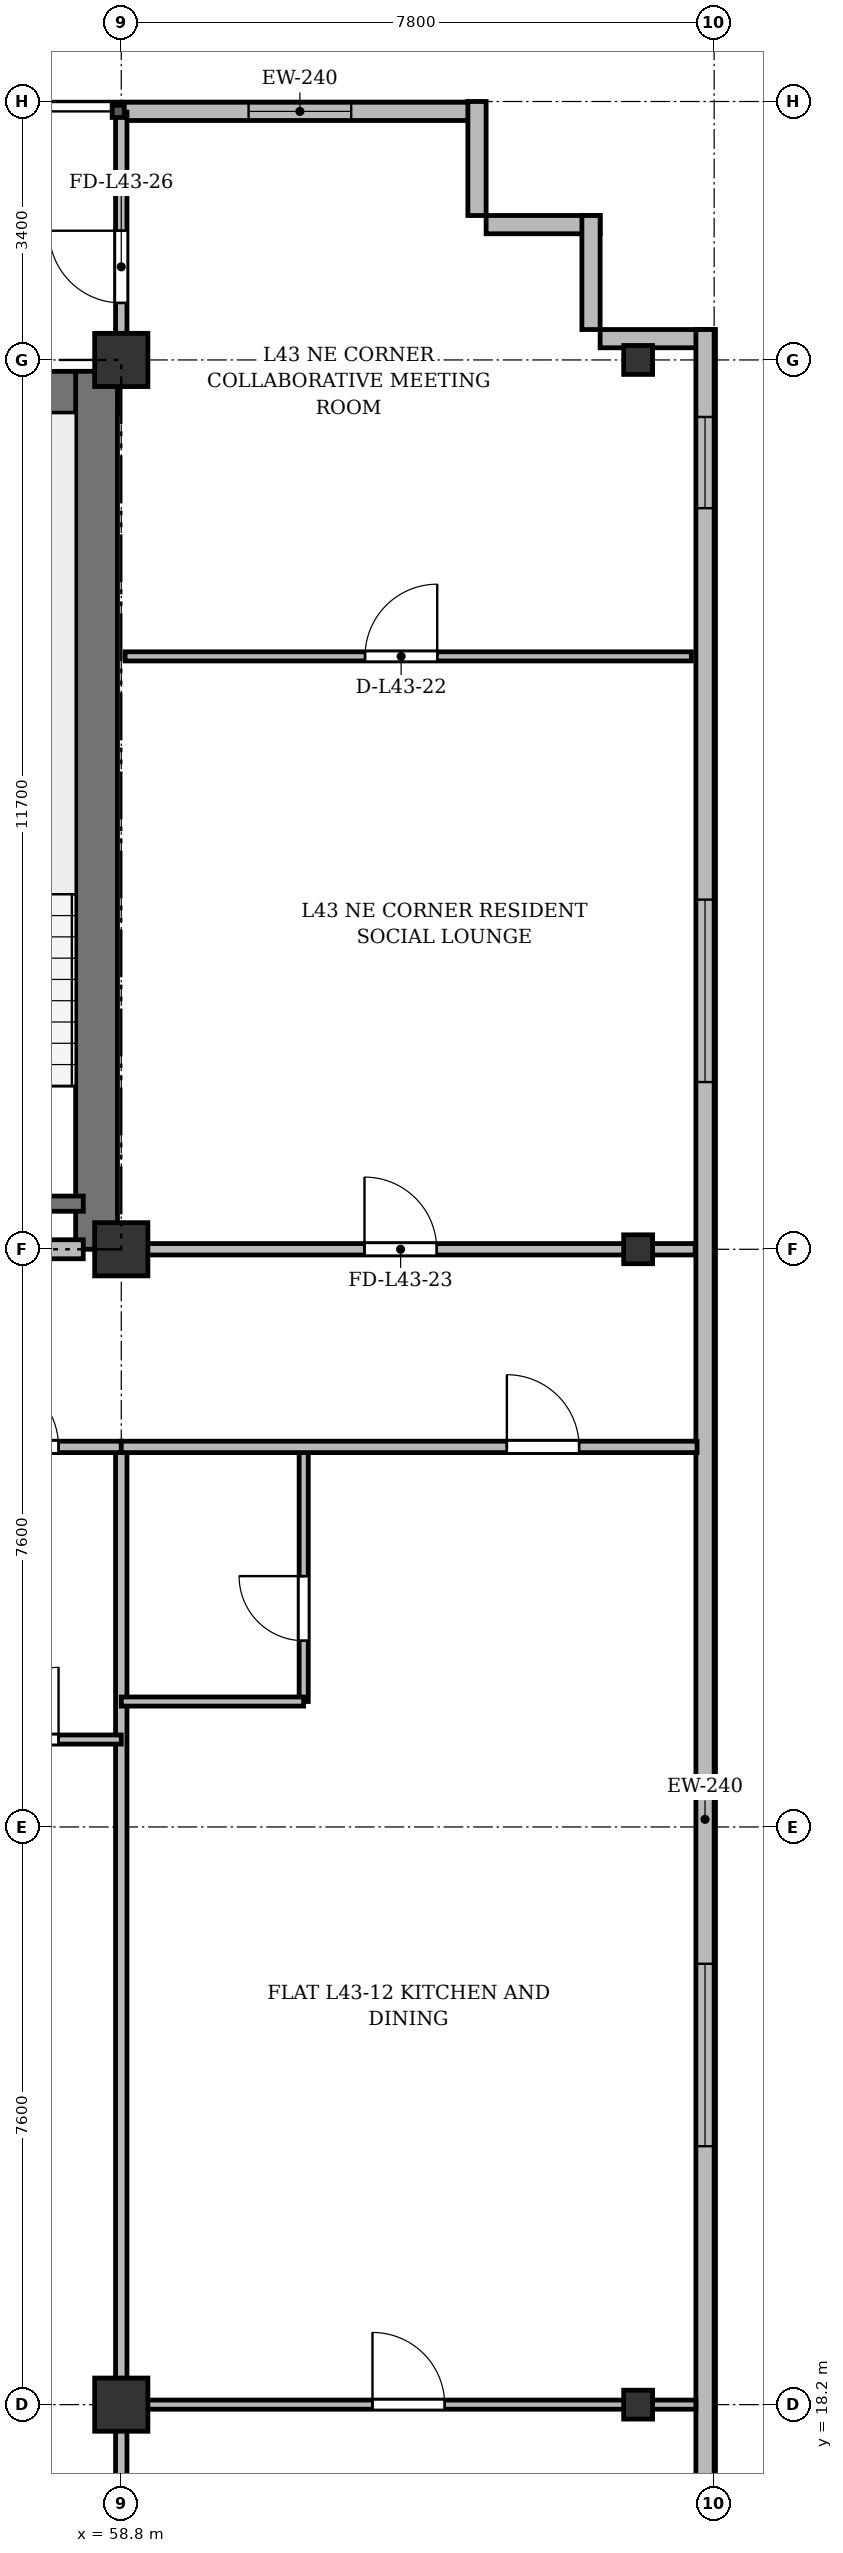
"""IFC4 building model, lengths in metres.
Left out: names, types, materials, properties, quantities, classifications, styles, units other than length and angle.
Written with IfcOpenShell. Run it as: python <this file> out.ifc"""

import sys

from ifc_helpers import new_model, si_unit, direction, frame, frame_2d, origin, origin_2d, place, context, subcontext, project, spatial, rectangle, i_section, extrude, source, transform, mapped, element, fill, save


model = new_model("IFC4")
c1 = context("Model", 3, precision=1e-05, world=origin(), true_north=direction((0.0, 1.0)))
c2 = subcontext(c1, "Body", "Model", "MODEL_VIEW")
j1 = project(units=[si_unit("LENGTHUNIT", "METRE"), si_unit("PLANEANGLEUNIT", "RADIAN")], contexts=[c1])
p1 = place(None, origin())
s1 = spatial("IfcSite", under=j1, at=p1, CompositionType="ELEMENT")
p2 = place(p1, origin())
s2 = spatial("IfcBuilding", under=s1, at=p2, CompositionType="ELEMENT")
p3 = place(p2, frame((0.0, 0.0, 164.5)))
s3 = spatial("IfcBuildingStorey", under=s2, at=p3, CompositionType="ELEMENT", Elevation=164.5)
m1 = source(origin(), c2, "Body", "SweptSolid", [
    extrude(rectangle(XDim=0.7, YDim=0.7, at=origin_2d()), origin(), (0.0, 0.0, 1.0), 3.6),
])
for number, where, z_axis, x_axis in (
    (1, (58.8, 18.2, 0.0), (0.0, 0.0, 1.0), (1.0, 0.0, 0.0)),
    (2, (58.8, 33.4, 0.0), (0.0, 0.0, 1.0), (1.0, 0.0, 0.0)),
    (3, (58.8, 45.1, 0.0), (0.0, 0.0, 1.0), (1.0, 0.0, 0.0)),
):
    element("IfcColumn", number, at=place(p3, frame(where, z_axis=z_axis, x_axis=x_axis)), inside=s3, PredefinedType="COLUMN", context=c2, shape_type="MappedRepresentation", body=[
        mapped(m1, transform((0.0, 0.0, 0.0), x_axis=(1.0, 0.0, 0.0), y_axis=(0.0, 1.0, 0.0), z_axis=(0.0, 0.0, 1.0), scale=1.0)),
    ])
m2 = source(origin(), c2, "Body", "SweptSolid", [
    extrude(i_section(OverallWidth=0.38, OverallDepth=0.38, WebThickness=0.02, FlangeThickness=0.03, at=origin_2d()), origin(), (0.0, 0.0, 1.0), 3.6),
])
for number, where, z_axis, x_axis in (
    (4, (65.6, 18.2, 0.0), (0.0, 0.0, 1.0), (1.0, 0.0, 0.0)),
    (5, (65.6, 33.4, 0.0), (0.0, 0.0, 1.0), (1.0, 0.0, 0.0)),
    (6, (65.6, 45.1, 0.0), (0.0, 0.0, 1.0), (1.0, 0.0, 0.0)),
):
    element("IfcColumn", number, at=place(p3, frame(where, z_axis=z_axis, x_axis=x_axis)), inside=s3, PredefinedType="COLUMN", context=c2, shape_type="MappedRepresentation", body=[
        mapped(m2, transform((0.0, 0.0, 0.0), x_axis=(1.0, 0.0, 0.0), y_axis=(0.0, 1.0, 0.0), z_axis=(0.0, 0.0, 1.0), scale=1.0)),
    ])
p4 = place(p3, frame((58.8, 48.37, 0.0), z_axis=(0.0, 0.0, 1.0), x_axis=(1.0, 0.0, 0.0)))
e7 = element("IfcWall", 7, at=p4, inside=s3, PredefinedType="SOLIDWALL", context=c2, shape_type="SweptSolid", body=[
    extrude(rectangle(XDim=4.7, YDim=0.24, at=frame_2d((2.35, 0.0))), origin(), (0.0, 0.0, 1.0), 3.35),
])
p5 = place(p4, frame((1.675, 0.0, 0.9)))
e8 = element("IfcOpeningElement", 8, at=p5, cuts=e7, PredefinedType="OPENING", context=c2, shape_type="SweptSolid", body=[
    extrude(rectangle(XDim=1.35, YDim=1.5, at=frame_2d((0.675, 0.75))), frame((0.0, 0.13, 0.0), z_axis=(0.0, -1.0, 0.0), x_axis=(1.0, 0.0, 0.0)), (0.0, 0.0, 1.0), 0.26),
])
for number, where, z_axis, x_axis in (
    (9, (63.48, 48.5, 0.0), (0.0, 0.0, 1.0), (0.0, -1.0, 0.0)),
    (10, (63.6, 46.88, 0.0), (0.0, 0.0, 1.0), (1.0, 0.0, 0.0)),
    (11, (64.98, 47.0, 0.0), (0.0, 0.0, 1.0), (0.0, -1.0, 0.0)),
    (12, (65.1, 45.38, 0.0), (0.0, 0.0, 1.0), (1.0, 0.0, 0.0)),
):
    element("IfcWall", number, at=place(p3, frame(where, z_axis=z_axis, x_axis=x_axis)), inside=s3, PredefinedType="SOLIDWALL", context=c2, shape_type="SweptSolid", body=[
        extrude(rectangle(XDim=1.5, YDim=0.24, at=frame_2d((0.75, 0.0))), origin(), (0.0, 0.0, 1.0), 3.35),
    ])
p6 = place(p3, frame((66.48, 45.5, 0.0), z_axis=(0.0, 0.0, 1.0), x_axis=(0.0, -1.0, 0.0)))
e13 = element("IfcWall", 13, at=p6, inside=s3, PredefinedType="SOLIDWALL", context=c2, shape_type="SweptSolid", body=[
    extrude(rectangle(XDim=39.2, YDim=0.24, at=frame_2d((19.6, 0.0))), origin(), (0.0, 0.0, 1.0), 3.35),
])
p7 = place(p6, frame((36.55, 0.0, 0.92)))
e14 = element("IfcOpeningElement", 14, at=p7, cuts=e13, PredefinedType="OPENING", context=c2, shape_type="SweptSolid", body=[
    extrude(rectangle(XDim=1.2, YDim=1.65, at=frame_2d((0.6, 0.825))), frame((0.0, 0.13, 0.0), z_axis=(0.0, -1.0, 0.0), x_axis=(1.0, 0.0, 0.0)), (0.0, 0.0, 1.0), 0.26),
])
p8 = place(p6, frame((32.9, 0.0, 0.92)))
e15 = element("IfcOpeningElement", 15, at=p8, cuts=e13, PredefinedType="OPENING", context=c2, shape_type="SweptSolid", body=[
    extrude(rectangle(XDim=2.4, YDim=2.1, at=frame_2d((1.2, 1.05))), frame((0.0, 0.13, 0.0), z_axis=(0.0, -1.0, 0.0), x_axis=(1.0, 0.0, 0.0)), (0.0, 0.0, 1.0), 0.26),
])
p9 = place(p6, frame((28.7, 0.0, 0.92)))
e16 = element("IfcOpeningElement", 16, at=p9, cuts=e13, PredefinedType="OPENING", context=c2, shape_type="SweptSolid", body=[
    extrude(rectangle(XDim=2.4, YDim=2.1, at=frame_2d((1.2, 1.05))), frame((0.0, 0.13, 0.0), z_axis=(0.0, -1.0, 0.0), x_axis=(1.0, 0.0, 0.0)), (0.0, 0.0, 1.0), 0.26),
])
p10 = place(p6, frame((21.5, 0.0, 0.92)))
e17 = element("IfcOpeningElement", 17, at=p10, cuts=e13, PredefinedType="OPENING", context=c2, shape_type="SweptSolid", body=[
    extrude(rectangle(XDim=2.4, YDim=2.1, at=frame_2d((1.2, 1.05))), frame((0.0, 0.13, 0.0), z_axis=(0.0, -1.0, 0.0), x_axis=(1.0, 0.0, 0.0)), (0.0, 0.0, 1.0), 0.26),
])
p11 = place(p6, frame((7.5, 0.0, 0.92)))
e18 = element("IfcOpeningElement", 18, at=p11, cuts=e13, PredefinedType="OPENING", context=c2, shape_type="SweptSolid", body=[
    extrude(rectangle(XDim=2.4, YDim=2.1, at=frame_2d((1.2, 1.05))), frame((0.0, 0.13, 0.0), z_axis=(0.0, -1.0, 0.0), x_axis=(1.0, 0.0, 0.0)), (0.0, 0.0, 1.0), 0.26),
])
p12 = place(p6, frame((1.15, 0.0, 0.92)))
e19 = element("IfcOpeningElement", 19, at=p12, cuts=e13, PredefinedType="OPENING", context=c2, shape_type="SweptSolid", body=[
    extrude(rectangle(XDim=1.2, YDim=1.65, at=frame_2d((0.6, 0.825))), frame((0.0, 0.13, 0.0), z_axis=(0.0, -1.0, 0.0), x_axis=(1.0, 0.0, 0.0)), (0.0, 0.0, 1.0), 0.26),
])
p13 = place(p3, frame((15.65, 44.675, 0.0), z_axis=(0.0, 0.0, 1.0), x_axis=(1.0, 0.0, 0.0)))
e20 = element("IfcWall", 20, at=p13, inside=s3, PredefinedType="SHEAR", context=c2, shape_type="SweptSolid", body=[
    extrude(rectangle(XDim=43.1, YDim=0.55, at=frame_2d((21.55, 0.0))), origin(), (0.0, 0.0, 1.0), 3.35),
])
p14 = place(p3, frame((58.475, 33.4, 0.0), z_axis=(0.0, 0.0, 1.0), x_axis=(0.0, 1.0, 0.0)))
e21 = element("IfcWall", 21, at=p14, inside=s3, PredefinedType="SHEAR", context=c2, shape_type="SweptSolid", body=[
    extrude(rectangle(XDim=11.55, YDim=0.55, at=frame_2d((5.775, 0.0))), origin(), (0.0, 0.0, 1.0), 3.35),
])
p15 = place(p3, frame((54.9, 34.0, 0.0), z_axis=(0.0, 0.0, 1.0), x_axis=(1.0, 0.0, 0.0)))
e22 = element("IfcWall", 22, at=p15, inside=s3, PredefinedType="SHEAR", context=c2, shape_type="SweptSolid", body=[
    extrude(rectangle(XDim=3.4, YDim=0.2, at=frame_2d((1.7, 0.0))), origin(), (0.0, 0.0, 1.0), 3.35),
])
p16 = place(p3, frame((47.15, 33.4, 0.0), z_axis=(0.0, 0.0, 1.0), x_axis=(1.0, 0.0, 0.0)))
e23 = element("IfcWall", 23, at=p16, inside=s3, PredefinedType="PARTITIONING", context=c2, shape_type="SweptSolid", body=[
    extrude(rectangle(XDim=11.15, YDim=0.25, at=frame_2d((5.575, 0.0))), origin(), (0.0, 0.0, 1.0), 2.75),
])
p17 = place(p16, frame((0.7, 0.0, 0.0)))
e24 = element("IfcOpeningElement", 24, at=p17, cuts=e23, PredefinedType="OPENING", context=c2, shape_type="SweptSolid", body=[
    extrude(rectangle(XDim=0.95, YDim=2.15, at=frame_2d((0.475, 1.075))), frame((0.0, 0.135, 0.0), z_axis=(0.0, -1.0, 0.0), x_axis=(1.0, 0.0, 0.0)), (0.0, 0.0, 1.0), 0.27),
])
p18 = place(p16, frame((6.0, 0.0, 0.0)))
e25 = element("IfcOpeningElement", 25, at=p18, cuts=e23, PredefinedType="OPENING", context=c2, shape_type="SweptSolid", body=[
    extrude(rectangle(XDim=1.2, YDim=2.15, at=frame_2d((0.6, 1.075))), frame((0.0, 0.135, 0.0), z_axis=(0.0, -1.0, 0.0), x_axis=(1.0, 0.0, 0.0)), (0.0, 0.0, 1.0), 0.27),
])
p19 = place(p3, frame((58.85, 41.2, 0.0), z_axis=(0.0, 0.0, 1.0), x_axis=(1.0, 0.0, 0.0)))
e26 = element("IfcWall", 26, at=p19, inside=s3, PredefinedType="PARTITIONING", context=c2, shape_type="SweptSolid", body=[
    extrude(rectangle(XDim=7.45, YDim=0.12, at=frame_2d((3.725, 0.0))), origin(), (0.0, 0.0, 1.0), 2.85),
])
p20 = place(p19, frame((3.157, 0.0, 0.0)))
e27 = element("IfcOpeningElement", 27, at=p20, cuts=e26, PredefinedType="OPENING", context=c2, shape_type="SweptSolid", body=[
    extrude(rectangle(XDim=0.95, YDim=2.15, at=frame_2d((0.475, 1.075))), frame((0.0, 0.07, 0.0), z_axis=(0.0, -1.0, 0.0), x_axis=(1.0, 0.0, 0.0)), (0.0, 0.0, 1.0), 0.14),
])
p21 = place(p3, frame((58.8, 33.4, 0.0), z_axis=(0.0, 0.0, 1.0), x_axis=(1.0, 0.0, 0.0)))
e28 = element("IfcWall", 28, at=p21, inside=s3, PredefinedType="PARTITIONING", context=c2, shape_type="SweptSolid", body=[
    extrude(rectangle(XDim=7.55, YDim=0.15, at=frame_2d((3.775, 0.0))), origin(), (0.0, 0.0, 1.0), 2.75),
])
p22 = place(p21, frame((3.2, 0.0, 0.0)))
e29 = element("IfcOpeningElement", 29, at=p22, cuts=e28, PredefinedType="OPENING", context=c2, shape_type="SweptSolid", body=[
    extrude(rectangle(XDim=0.95, YDim=2.15, at=frame_2d((0.475, 1.075))), frame((0.0, 0.085, 0.0), z_axis=(0.0, -1.0, 0.0), x_axis=(1.0, 0.0, 0.0)), (0.0, 0.0, 1.0), 0.17),
])
p23 = place(p3, frame((58.8, 44.75, 0.0), z_axis=(0.0, 0.0, 1.0), x_axis=(0.0, 1.0, 0.0)))
e30 = element("IfcWall", 30, at=p23, inside=s3, PredefinedType="PARTITIONING", context=c2, shape_type="SweptSolid", body=[
    extrude(rectangle(XDim=3.61, YDim=0.15, at=frame_2d((1.805, 0.0))), origin(), (0.0, 0.0, 1.0), 2.85),
])
p24 = place(p23, frame((1.1, 0.0, 0.0)))
e31 = element("IfcOpeningElement", 31, at=p24, cuts=e30, PredefinedType="OPENING", context=c2, shape_type="SweptSolid", body=[
    extrude(rectangle(XDim=0.95, YDim=2.15, at=frame_2d((0.475, 1.075))), frame((0.0, 0.085, 0.0), z_axis=(0.0, -1.0, 0.0), x_axis=(1.0, 0.0, 0.0)), (0.0, 0.0, 1.0), 0.17),
])
p25 = place(p3, frame((58.8, 3.525, 0.0), z_axis=(0.0, 0.0, 1.0), x_axis=(0.0, 1.0, 0.0)))
e32 = element("IfcWall", 32, at=p25, inside=s3, PredefinedType="PARTITIONING", context=c2, shape_type="SweptSolid", body=[
    extrude(rectangle(XDim=27.275, YDim=0.15, at=frame_2d((13.638, 0.0))), origin(), (0.0, 0.0, 1.0), 2.85),
])
p26 = place(p3, frame((56.2, 30.8, 0.0), z_axis=(0.0, 0.0, 1.0), x_axis=(1.0, 0.0, 0.0)))
e33 = element("IfcWall", 33, at=p26, inside=s3, PredefinedType="PARTITIONING", context=c2, shape_type="SweptSolid", body=[
    extrude(rectangle(XDim=2.6, YDim=0.15, at=frame_2d((1.3, 0.0))), origin(), (0.0, 0.0, 1.0), 2.85),
])
p27 = place(p26, frame((0.825, 0.0, 0.0)))
e34 = element("IfcOpeningElement", 34, at=p27, cuts=e33, PredefinedType="OPENING", context=c2, shape_type="SweptSolid", body=[
    extrude(rectangle(XDim=0.95, YDim=2.15, at=frame_2d((0.475, 1.075))), frame((0.0, 0.085, 0.0), z_axis=(0.0, -1.0, 0.0), x_axis=(1.0, 0.0, 0.0)), (0.0, 0.0, 1.0), 0.17),
])
p28 = place(p3, frame((56.2, 26.95, 0.0), z_axis=(0.0, 0.0, 1.0), x_axis=(1.0, 0.0, 0.0)))
e35 = element("IfcWall", 35, at=p28, inside=s3, PredefinedType="PARTITIONING", context=c2, shape_type="SweptSolid", body=[
    extrude(rectangle(XDim=2.6, YDim=0.12, at=frame_2d((1.3, 0.0))), origin(), (0.0, 0.0, 1.0), 2.85),
])
p29 = place(p28, frame((0.825, 0.0, 0.0)))
e36 = element("IfcOpeningElement", 36, at=p29, cuts=e35, PredefinedType="OPENING", context=c2, shape_type="SweptSolid", body=[
    extrude(rectangle(XDim=0.95, YDim=2.15, at=frame_2d((0.475, 1.075))), frame((0.0, 0.07, 0.0), z_axis=(0.0, -1.0, 0.0), x_axis=(1.0, 0.0, 0.0)), (0.0, 0.0, 1.0), 0.14),
])
p30 = place(p3, frame((58.8, 18.2, 0.0), z_axis=(0.0, 0.0, 1.0), x_axis=(1.0, 0.0, 0.0)))
e37 = element("IfcWall", 37, at=p30, inside=s3, PredefinedType="PARTITIONING", context=c2, shape_type="SweptSolid", body=[
    extrude(rectangle(XDim=7.56, YDim=0.12, at=frame_2d((3.78, 0.0))), origin(), (0.0, 0.0, 1.0), 2.75),
])
p31 = place(p30, frame((3.305, 0.0, 0.0)))
e38 = element("IfcOpeningElement", 38, at=p31, cuts=e37, PredefinedType="OPENING", context=c2, shape_type="SweptSolid", body=[
    extrude(rectangle(XDim=0.95, YDim=2.15, at=frame_2d((0.475, 1.075))), frame((0.0, 0.07, 0.0), z_axis=(0.0, -1.0, 0.0), x_axis=(1.0, 0.0, 0.0)), (0.0, 0.0, 1.0), 0.14),
])
p32 = place(p3, frame((61.2, 27.45, 0.0), z_axis=(0.0, 0.0, 1.0), x_axis=(0.0, 1.0, 0.0)))
e39 = element("IfcWall", 39, at=p32, inside=s3, PredefinedType="PARTITIONING", context=c2, shape_type="SweptSolid", body=[
    extrude(rectangle(XDim=3.35, YDim=0.12, at=frame_2d((1.675, 0.0))), origin(), (0.0, 0.0, 1.0), 3.35),
])
p33 = place(p32, frame((0.8, 0.0, 0.0)))
e40 = element("IfcOpeningElement", 40, at=p33, cuts=e39, PredefinedType="OPENING", context=c2, shape_type="SweptSolid", body=[
    extrude(rectangle(XDim=0.85, YDim=2.1, at=frame_2d((0.425, 1.05))), frame((0.0, 0.07, 0.0), z_axis=(0.0, -1.0, 0.0), x_axis=(1.0, 0.0, 0.0)), (0.0, 0.0, 1.0), 0.14),
])
p34 = place(p3, frame((58.8, 27.45, 0.0), z_axis=(0.0, 0.0, 1.0), x_axis=(1.0, 0.0, 0.0)))
e41 = element("IfcWall", 41, at=p34, inside=s3, PredefinedType="PARTITIONING", context=c2, shape_type="SweptSolid", body=[
    extrude(rectangle(XDim=2.4, YDim=0.12, at=frame_2d((1.2, 0.0))), origin(), (0.0, 0.0, 1.0), 2.85),
])
p35 = place(p3, frame((58.8, 30.8, 0.0), z_axis=(0.0, 0.0, 1.0), x_axis=(1.0, 0.0, 0.0)))
e42 = element("IfcWall", 42, at=p35, inside=s3, PredefinedType="PARTITIONING", context=c2, shape_type="SweptSolid", body=[
    extrude(rectangle(XDim=7.575, YDim=0.15, at=frame_2d((3.788, 0.0))), origin(), (0.0, 0.0, 1.0), 2.85),
])
p36 = place(p35, frame((5.073, 0.0, 0.0)))
e43 = element("IfcOpeningElement", 43, at=p36, cuts=e42, PredefinedType="OPENING", context=c2, shape_type="SweptSolid", body=[
    extrude(rectangle(XDim=0.95, YDim=2.15, at=frame_2d((0.475, 1.075))), frame((0.0, 0.085, 0.0), z_axis=(0.0, -1.0, 0.0), x_axis=(1.0, 0.0, 0.0)), (0.0, 0.0, 1.0), 0.17),
])
m3 = source(origin(), c2, "Body", "SweptSolid", [
    extrude(rectangle(XDim=1.35, YDim=1.5, at=frame_2d((0.675, 0.75))), frame((0.0, 0.03, 0.0), z_axis=(0.0, -1.0, 0.0), x_axis=(1.0, 0.0, 0.0)), (0.0, 0.0, 1.0), 0.06),
])
p37 = place(p5, origin())
e44 = element("IfcWindow", 44, at=p37, inside=s3, PartitioningType="SINGLE_PANEL", PredefinedType="WINDOW", context=c2, shape_type="MappedRepresentation", body=[
    mapped(m3, transform((0.0, 0.0, 0.0), x_axis=(1.0, 0.0, 0.0), y_axis=(0.0, 1.0, 0.0), z_axis=(0.0, 0.0, 1.0), scale=1.0)),
])
fill(e8, e44)
m4 = source(origin(), c2, "Body", "SweptSolid", [
    extrude(rectangle(XDim=2.4, YDim=2.1, at=frame_2d((1.2, 1.05))), frame((0.0, 0.03, 0.0), z_axis=(0.0, -1.0, 0.0), x_axis=(1.0, 0.0, 0.0)), (0.0, 0.0, 1.0), 0.06),
])
p38 = place(p10, origin())
e45 = element("IfcWindow", 45, at=p38, inside=s3, PartitioningType="SINGLE_PANEL", PredefinedType="WINDOW", context=c2, shape_type="MappedRepresentation", body=[
    mapped(m4, transform((0.0, 0.0, 0.0), x_axis=(1.0, 0.0, 0.0), y_axis=(0.0, 1.0, 0.0), z_axis=(0.0, 0.0, 1.0), scale=1.0)),
])
fill(e17, e45)
p39 = place(p11, origin())
e46 = element("IfcWindow", 46, at=p39, inside=s3, PartitioningType="SINGLE_PANEL", PredefinedType="WINDOW", context=c2, shape_type="MappedRepresentation", body=[
    mapped(m4, transform((0.0, 0.0, 0.0), x_axis=(1.0, 0.0, 0.0), y_axis=(0.0, 1.0, 0.0), z_axis=(0.0, 0.0, 1.0), scale=1.0)),
])
fill(e18, e46)
m5 = source(origin(), c2, "Body", "SweptSolid", [
    extrude(rectangle(XDim=1.2, YDim=1.65, at=frame_2d((0.6, 0.825))), frame((0.0, 0.03, 0.0), z_axis=(0.0, -1.0, 0.0), x_axis=(1.0, 0.0, 0.0)), (0.0, 0.0, 1.0), 0.06),
])
p40 = place(p12, origin())
e47 = element("IfcWindow", 47, at=p40, inside=s3, PartitioningType="SINGLE_PANEL", PredefinedType="WINDOW", context=c2, shape_type="MappedRepresentation", body=[
    mapped(m5, transform((0.0, 0.0, 0.0), x_axis=(1.0, 0.0, 0.0), y_axis=(0.0, 1.0, 0.0), z_axis=(0.0, 0.0, 1.0), scale=1.0)),
])
fill(e19, e47)
m6 = source(origin(), c2, "Body", "SweptSolid", [
    extrude(rectangle(XDim=0.95, YDim=2.15, at=frame_2d((0.475, 1.075))), frame((0.0, 0.025, 0.0), z_axis=(0.0, -1.0, 0.0), x_axis=(1.0, 0.0, 0.0)), (0.0, 0.0, 1.0), 0.05),
])
p41 = place(p20, origin())
e48 = element("IfcDoor", 48, at=p41, inside=s3, OperationType="SINGLE_SWING_RIGHT", PredefinedType="DOOR", context=c2, shape_type="MappedRepresentation", body=[
    mapped(m6, transform((0.0, 0.0, 0.0), x_axis=(1.0, 0.0, 0.0), y_axis=(0.0, 1.0, 0.0), z_axis=(0.0, 0.0, 1.0), scale=1.0)),
])
fill(e27, e48)
p42 = place(p22, origin())
e49 = element("IfcDoor", 49, at=p42, inside=s3, OperationType="SINGLE_SWING_LEFT", PredefinedType="DOOR", context=c2, shape_type="MappedRepresentation", body=[
    mapped(m6, transform((0.0, 0.0, 0.0), x_axis=(1.0, 0.0, 0.0), y_axis=(0.0, 1.0, 0.0), z_axis=(0.0, 0.0, 1.0), scale=1.0)),
])
fill(e29, e49)
p43 = place(p24, origin())
e50 = element("IfcDoor", 50, at=p43, inside=s3, OperationType="SINGLE_SWING_RIGHT", PredefinedType="DOOR", context=c2, shape_type="MappedRepresentation", body=[
    mapped(m6, transform((0.0, 0.0, 0.0), x_axis=(1.0, 0.0, 0.0), y_axis=(0.0, 1.0, 0.0), z_axis=(0.0, 0.0, 1.0), scale=1.0)),
])
fill(e31, e50)
p44 = place(p27, origin())
e51 = element("IfcDoor", 51, at=p44, inside=s3, OperationType="SINGLE_SWING_LEFT", PredefinedType="DOOR", context=c2, shape_type="MappedRepresentation", body=[
    mapped(m6, transform((0.0, 0.0, 0.0), x_axis=(1.0, 0.0, 0.0), y_axis=(0.0, 1.0, 0.0), z_axis=(0.0, 0.0, 1.0), scale=1.0)),
])
fill(e34, e51)
p45 = place(p29, origin())
e52 = element("IfcDoor", 52, at=p45, inside=s3, OperationType="SINGLE_SWING_RIGHT", PredefinedType="DOOR", context=c2, shape_type="MappedRepresentation", body=[
    mapped(m6, transform((0.0, 0.0, 0.0), x_axis=(1.0, 0.0, 0.0), y_axis=(0.0, 1.0, 0.0), z_axis=(0.0, 0.0, 1.0), scale=1.0)),
])
fill(e36, e52)
p46 = place(p31, origin())
e53 = element("IfcDoor", 53, at=p46, inside=s3, OperationType="SINGLE_SWING_LEFT", PredefinedType="DOOR", context=c2, shape_type="MappedRepresentation", body=[
    mapped(m6, transform((0.0, 0.0, 0.0), x_axis=(1.0, 0.0, 0.0), y_axis=(0.0, 1.0, 0.0), z_axis=(0.0, 0.0, 1.0), scale=1.0)),
])
fill(e38, e53)
m7 = source(origin(), c2, "Body", "SweptSolid", [
    extrude(rectangle(XDim=0.85, YDim=2.1, at=frame_2d((0.425, 1.05))), frame((0.0, 0.025, 0.0), z_axis=(0.0, -1.0, 0.0), x_axis=(1.0, 0.0, 0.0)), (0.0, 0.0, 1.0), 0.05),
])
p47 = place(p33, origin())
e54 = element("IfcDoor", 54, at=p47, inside=s3, OperationType="SINGLE_SWING_RIGHT", PredefinedType="DOOR", context=c2, shape_type="MappedRepresentation", body=[
    mapped(m7, transform((0.0, 0.0, 0.0), x_axis=(1.0, 0.0, 0.0), y_axis=(0.0, 1.0, 0.0), z_axis=(0.0, 0.0, 1.0), scale=1.0)),
])
fill(e40, e54)
p48 = place(p36, origin())
e55 = element("IfcDoor", 55, at=p48, inside=s3, OperationType="SINGLE_SWING_LEFT", PredefinedType="DOOR", context=c2, shape_type="MappedRepresentation", body=[
    mapped(m6, transform((0.0, 0.0, 0.0), x_axis=(1.0, 0.0, 0.0), y_axis=(0.0, 1.0, 0.0), z_axis=(0.0, 0.0, 1.0), scale=1.0)),
])
fill(e43, e55)
save(model, sys.argv[1])
